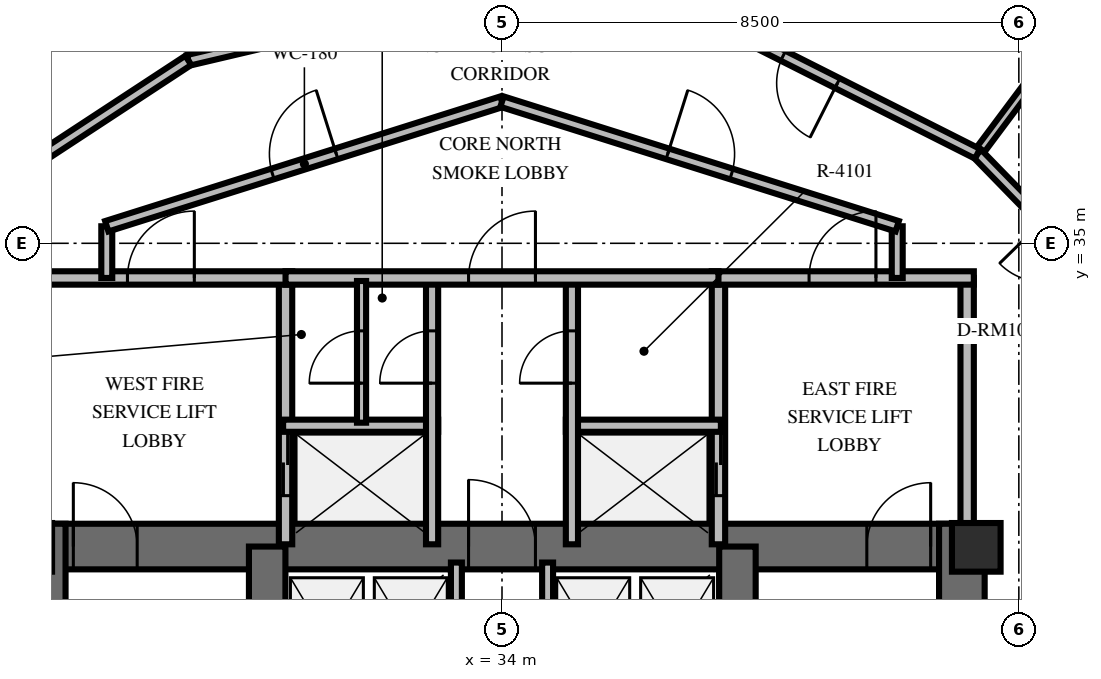
"""IFC4 building model, lengths in metres.
Left out: names, types, materials, properties, quantities, classifications, styles, units other than length and angle.
Written with IfcOpenShell. Run it as: python <this file> out.ifc"""

import sys

from ifc_helpers import new_model, si_unit, direction, frame, frame_2d, origin, origin_2d, place, context, subcontext, project, spatial, rectangle, extrude, element, fill, save


model = new_model("IFC4")
c1 = context("Model", 3, precision=1e-05, world=origin(), true_north=direction((0.0, 1.0)))
c2 = subcontext(c1, "Body", "Model", "MODEL_VIEW")
j1 = project(units=[si_unit("LENGTHUNIT", "METRE"), si_unit("PLANEANGLEUNIT", "RADIAN")], contexts=[c1])
p1 = place(None, origin())
s1 = spatial("IfcSite", under=j1, at=p1, CompositionType="ELEMENT")
p2 = place(p1, origin())
s2 = spatial("IfcBuilding", under=s1, at=p2, CompositionType="ELEMENT")
p3 = place(p2, frame((0.0, 0.0, 173.6)))
s3 = spatial("IfcBuildingStorey", under=s2, at=p3, CompositionType="ELEMENT", Elevation=173.6)
p4 = place(p3, frame((26.072, 30.013, 0.0), z_axis=(0.0, 0.0, 1.0), x_axis=(1.0, 0.0, 0.0)))
e1 = element("IfcWall", 1, at=p4, inside=s3, PredefinedType="SHEAR", context=c2, shape_type="SweptSolid", body=[
    extrude(rectangle(XDim=15.866, YDim=0.75, at=frame_2d((7.933, 0.0))), origin(), (0.0, 0.0, 1.0), 3.6),
])
p5 = place(p4, frame((0.878, 0.0, 0.0)))
e2 = element("IfcOpeningElement", 2, at=p5, cuts=e1, PredefinedType="OPENING", context=c2, shape_type="SweptSolid", body=[
    extrude(rectangle(XDim=1.05, YDim=2.15, at=frame_2d((0.525, 1.075))), frame((0.0, 0.385, 0.0), z_axis=(0.0, -1.0, 0.0), x_axis=(1.0, 0.0, 0.0)), (0.0, 0.0, 1.0), 0.77),
])
p6 = place(p4, frame((13.928, 0.0, 0.0)))
e3 = element("IfcOpeningElement", 3, at=p6, cuts=e1, PredefinedType="OPENING", context=c2, shape_type="SweptSolid", body=[
    extrude(rectangle(XDim=1.05, YDim=2.15, at=frame_2d((0.525, 1.075))), frame((0.0, 0.385, 0.0), z_axis=(0.0, -1.0, 0.0), x_axis=(1.0, 0.0, 0.0)), (0.0, 0.0, 1.0), 0.77),
])
p7 = place(p4, frame((7.378, 0.0, 0.0)))
e4 = element("IfcOpeningElement", 4, at=p7, cuts=e1, PredefinedType="OPENING", context=c2, shape_type="SweptSolid", body=[
    extrude(rectangle(XDim=1.1, YDim=2.15, at=frame_2d((0.55, 1.075))), frame((0.0, 0.385, 0.0), z_axis=(0.0, -1.0, 0.0), x_axis=(1.0, 0.0, 0.0)), (0.0, 0.0, 1.0), 0.77),
])
for number, where, z_axis, x_axis in (
    (5, (26.447, 19.812, 0.0), (0.0, 0.0, 1.0), (0.0, 1.0, 0.0)),
    (6, (41.563, 19.812, 0.0), (0.0, 0.0, 1.0), (0.0, 1.0, 0.0)),
):
    element("IfcWall", number, at=place(p3, frame(where, z_axis=z_axis, x_axis=x_axis)), inside=s3, PredefinedType="SHEAR", context=c2, shape_type="SweptSolid", body=[
        extrude(rectangle(XDim=10.576, YDim=0.75, at=frame_2d((5.288, 0.0))), origin(), (0.0, 0.0, 1.0), 3.6),
    ])
for number, where, z_axis, x_axis in (
    (7, (30.138, 20.187, 0.0), (0.0, 0.0, 1.0), (0.0, 1.0, 0.0)),
    (8, (37.872, 20.187, 0.0), (0.0, 0.0, 1.0), (0.0, 1.0, 0.0)),
):
    element("IfcWall", number, at=place(p3, frame(where, z_axis=z_axis, x_axis=x_axis)), inside=s3, PredefinedType="SHEAR", context=c2, shape_type="SweptSolid", body=[
        extrude(rectangle(XDim=9.826, YDim=0.6, at=frame_2d((4.913, 0.0))), origin(), (0.0, 0.0, 1.0), 3.6),
    ])
p8 = place(p3, frame((41.8, 30.0, 0.0), z_axis=(0.0, 0.0, 1.0), x_axis=(1.0, 0.0, 0.0)))
e9 = element("IfcColumn", 9, at=p8, inside=s3, PredefinedType="PILASTER", context=c2, shape_type="SweptSolid", body=[
    extrude(rectangle(XDim=0.8, YDim=0.8, at=origin_2d()), origin(), (0.0, 0.0, 1.0), 3.6),
])
p9 = place(p3, frame((30.44, 30.05, 0.0), z_axis=(0.0, 0.0, 1.0), x_axis=(0.0, 1.0, 0.0)))
e10 = element("IfcWall", 10, at=p9, inside=s3, PredefinedType="SOLIDWALL", context=c2, shape_type="SweptSolid", body=[
    extrude(rectangle(XDim=4.38, YDim=0.22, at=frame_2d((2.19, 0.0))), origin(), (0.0, 0.0, 1.0), 2.46),
])
p10 = place(p9, frame((0.8, 0.0, 0.0)))
e11 = element("IfcOpeningElement", 11, at=p10, cuts=e10, PredefinedType="OPENING", context=c2, shape_type="SweptSolid", body=[
    extrude(rectangle(XDim=1.05, YDim=2.1, at=frame_2d((0.525, 1.05))), frame((0.0, 0.12, 0.0), z_axis=(0.0, -1.0, 0.0), x_axis=(1.0, 0.0, 0.0)), (0.0, 0.0, 1.0), 0.24),
])
p11 = place(p3, frame((26.24, 34.43, 0.0), z_axis=(0.0, 0.0, 1.0), x_axis=(1.0, 0.0, 0.0)))
e12 = element("IfcWall", 12, at=p11, inside=s3, PredefinedType="SOLIDWALL", context=c2, shape_type="SweptSolid", body=[
    extrude(rectangle(XDim=4.31, YDim=0.22, at=frame_2d((2.155, 0.0))), origin(), (0.0, 0.0, 1.0), 2.46),
])
p12 = place(p11, frame((1.6, 0.0, 0.0)))
e13 = element("IfcOpeningElement", 13, at=p12, cuts=e12, PredefinedType="OPENING", context=c2, shape_type="SweptSolid", body=[
    extrude(rectangle(XDim=1.1, YDim=2.15, at=frame_2d((0.55, 1.075))), frame((0.0, 0.12, 0.0), z_axis=(0.0, -1.0, 0.0), x_axis=(1.0, 0.0, 0.0)), (0.0, 0.0, 1.0), 0.24),
])
p13 = place(p3, frame((30.4, 32.0, 0.0), z_axis=(0.0, 0.0, 1.0), x_axis=(1.0, 0.0, 0.0)))
e14 = element("IfcWall", 14, at=p13, inside=s3, PredefinedType="SOLIDWALL", context=c2, shape_type="SweptSolid", body=[
    extrude(rectangle(XDim=2.55, YDim=0.2, at=frame_2d((1.275, 0.0))), origin(), (0.0, 0.0, 1.0), 2.46),
])
p14 = place(p3, frame((32.85, 30.05, 0.0), z_axis=(0.0, 0.0, 1.0), x_axis=(0.0, 1.0, 0.0)))
e15 = element("IfcWall", 15, at=p14, inside=s3, PredefinedType="SOLIDWALL", context=c2, shape_type="SweptSolid", body=[
    extrude(rectangle(XDim=4.38, YDim=0.2, at=frame_2d((2.19, 0.0))), origin(), (0.0, 0.0, 1.0), 2.46),
])
p15 = place(p14, frame((2.65, 0.0, 0.0)))
e16 = element("IfcOpeningElement", 16, at=p15, cuts=e15, PredefinedType="OPENING", context=c2, shape_type="SweptSolid", body=[
    extrude(rectangle(XDim=0.86, YDim=2.05, at=frame_2d((0.43, 1.025))), frame((0.0, 0.11, 0.0), z_axis=(0.0, -1.0, 0.0), x_axis=(1.0, 0.0, 0.0)), (0.0, 0.0, 1.0), 0.22),
])
p16 = place(p3, frame((37.56, 30.05, 0.0), z_axis=(0.0, 0.0, 1.0), x_axis=(0.0, 1.0, 0.0)))
e17 = element("IfcWall", 17, at=p16, inside=s3, PredefinedType="SOLIDWALL", context=c2, shape_type="SweptSolid", body=[
    extrude(rectangle(XDim=4.38, YDim=0.22, at=frame_2d((2.19, 0.0))), origin(), (0.0, 0.0, 1.0), 2.46),
])
p17 = place(p16, frame((0.8, 0.0, 0.0)))
e18 = element("IfcOpeningElement", 18, at=p17, cuts=e17, PredefinedType="OPENING", context=c2, shape_type="SweptSolid", body=[
    extrude(rectangle(XDim=1.05, YDim=2.1, at=frame_2d((0.525, 1.05))), frame((0.0, 0.12, 0.0), z_axis=(0.0, -1.0, 0.0), x_axis=(1.0, 0.0, 0.0)), (0.0, 0.0, 1.0), 0.24),
])
p18 = place(p3, frame((41.65, 30.05, 0.0), z_axis=(0.0, 0.0, 1.0), x_axis=(0.0, 1.0, 0.0)))
e19 = element("IfcWall", 19, at=p18, inside=s3, PredefinedType="SOLIDWALL", context=c2, shape_type="SweptSolid", body=[
    extrude(rectangle(XDim=4.38, YDim=0.22, at=frame_2d((2.19, 0.0))), origin(), (0.0, 0.0, 1.0), 2.46),
])
p19 = place(p3, frame((37.45, 34.43, 0.0), z_axis=(0.0, 0.0, 1.0), x_axis=(1.0, 0.0, 0.0)))
e20 = element("IfcWall", 20, at=p19, inside=s3, PredefinedType="SOLIDWALL", context=c2, shape_type="SweptSolid", body=[
    extrude(rectangle(XDim=4.31, YDim=0.22, at=frame_2d((2.155, 0.0))), origin(), (0.0, 0.0, 1.0), 2.46),
])
p20 = place(p19, frame((1.6, 0.0, 0.0)))
e21 = element("IfcOpeningElement", 21, at=p20, cuts=e20, PredefinedType="OPENING", context=c2, shape_type="SweptSolid", body=[
    extrude(rectangle(XDim=1.1, YDim=2.15, at=frame_2d((0.55, 1.075))), frame((0.0, 0.12, 0.0), z_axis=(0.0, -1.0, 0.0), x_axis=(1.0, 0.0, 0.0)), (0.0, 0.0, 1.0), 0.24),
])
p21 = place(p3, frame((35.05, 32.0, 0.0), z_axis=(0.0, 0.0, 1.0), x_axis=(1.0, 0.0, 0.0)))
e22 = element("IfcWall", 22, at=p21, inside=s3, PredefinedType="SOLIDWALL", context=c2, shape_type="SweptSolid", body=[
    extrude(rectangle(XDim=2.55, YDim=0.2, at=frame_2d((1.275, 0.0))), origin(), (0.0, 0.0, 1.0), 2.46),
])
p22 = place(p3, frame((35.15, 30.05, 0.0), z_axis=(0.0, 0.0, 1.0), x_axis=(0.0, 1.0, 0.0)))
e23 = element("IfcWall", 23, at=p22, inside=s3, PredefinedType="SOLIDWALL", context=c2, shape_type="SweptSolid", body=[
    extrude(rectangle(XDim=4.38, YDim=0.2, at=frame_2d((2.19, 0.0))), origin(), (0.0, 0.0, 1.0), 2.46),
])
p23 = place(p22, frame((2.65, 0.0, 0.0)))
e24 = element("IfcOpeningElement", 24, at=p23, cuts=e23, PredefinedType="OPENING", context=c2, shape_type="SweptSolid", body=[
    extrude(rectangle(XDim=0.86, YDim=2.05, at=frame_2d((0.43, 1.025))), frame((0.0, 0.11, 0.0), z_axis=(0.0, -1.0, 0.0), x_axis=(1.0, 0.0, 0.0)), (0.0, 0.0, 1.0), 0.22),
])
p24 = place(p3, frame((30.44, 34.43, 0.0), z_axis=(0.0, 0.0, 1.0), x_axis=(1.0, 0.0, 0.0)))
e25 = element("IfcWall", 25, at=p24, inside=s3, PredefinedType="SOLIDWALL", context=c2, shape_type="SweptSolid", body=[
    extrude(rectangle(XDim=7.12, YDim=0.22, at=frame_2d((3.56, 0.0))), origin(), (0.0, 0.0, 1.0), 2.46),
])
p25 = place(p24, frame((3.01, 0.0, 0.0)))
e26 = element("IfcOpeningElement", 26, at=p25, cuts=e25, PredefinedType="OPENING", context=c2, shape_type="SweptSolid", body=[
    extrude(rectangle(XDim=1.1, YDim=2.15, at=frame_2d((0.55, 1.075))), frame((0.0, 0.12, 0.0), z_axis=(0.0, -1.0, 0.0), x_axis=(1.0, 0.0, 0.0)), (0.0, 0.0, 1.0), 0.24),
])
p26 = place(p3, frame((31.69, 32.05, 0.0), z_axis=(0.0, 0.0, 1.0), x_axis=(0.0, 1.0, 0.0)))
e27 = element("IfcWall", 27, at=p26, inside=s3, PredefinedType="PARTITIONING", context=c2, shape_type="SweptSolid", body=[
    extrude(rectangle(XDim=2.33, YDim=0.15, at=frame_2d((1.165, 0.0))), origin(), (0.0, 0.0, 1.0), 2.46),
])
p27 = place(p26, frame((0.65, 0.0, 0.0)))
e28 = element("IfcOpeningElement", 28, at=p27, cuts=e27, PredefinedType="OPENING", context=c2, shape_type="SweptSolid", body=[
    extrude(rectangle(XDim=0.86, YDim=2.05, at=frame_2d((0.43, 1.025))), frame((0.0, 0.085, 0.0), z_axis=(0.0, -1.0, 0.0), x_axis=(1.0, 0.0, 0.0)), (0.0, 0.0, 1.0), 0.17),
])
for number, where, z_axis, x_axis in (
    (29, (33.25, 27.28, 0.0), (0.0, 0.0, 1.0), (0.0, 1.0, 0.0)),
    (30, (34.75, 27.28, 0.0), (0.0, 0.0, 1.0), (0.0, 1.0, 0.0)),
):
    element("IfcWall", number, at=place(p3, frame(where, z_axis=z_axis, x_axis=x_axis)), inside=s3, PredefinedType="SOLIDWALL", context=c2, shape_type="SweptSolid", body=[
        extrude(rectangle(XDim=2.47, YDim=0.18, at=frame_2d((1.235, 0.0))), origin(), (0.0, 0.0, 1.0), 2.46),
    ])
for number, where, z_axis, x_axis in (
    (31, (27.5, 34.43, 0.0), (0.0, 0.0, 1.0), (0.0, 1.0, 0.0)),
    (32, (40.5, 35.28, 0.0), (0.0, 0.0, 1.0), (0.0, -1.0, 0.0)),
):
    element("IfcWall", number, at=place(p3, frame(where, z_axis=z_axis, x_axis=x_axis)), inside=s3, PredefinedType="PARTITIONING", context=c2, shape_type="SweptSolid", body=[
        extrude(rectangle(XDim=0.85, YDim=0.18, at=frame_2d((0.425, 0.0))), origin(), (0.0, 0.0, 1.0), 2.46),
    ])
p28 = place(p3, frame((27.5, 35.28, 0.0), z_axis=(0.0, 0.0, 1.0), x_axis=(0.953691418528, 0.300786765376, 0.0)))
e33 = element("IfcWall", 33, at=p28, inside=s3, PredefinedType="PARTITIONING", context=c2, shape_type="SweptSolid", body=[
    extrude(rectangle(XDim=6.816, YDim=0.18, at=frame_2d((3.408, 0.0))), origin(), (0.0, 0.0, 1.0), 2.46),
])
p29 = place(p28, frame((2.858, 0.0, 0.0)))
e34 = element("IfcOpeningElement", 34, at=p29, cuts=e33, PredefinedType="OPENING", context=c2, shape_type="SweptSolid", body=[
    extrude(rectangle(XDim=1.1, YDim=2.15, at=frame_2d((0.55, 1.075))), frame((0.0, 0.1, 0.0), z_axis=(0.0, -1.0, 0.0), x_axis=(1.0, 0.0, 0.0)), (0.0, 0.0, 1.0), 0.2),
])
p30 = place(p3, frame((34.0, 37.33, 0.0), z_axis=(0.0, 0.0, 1.0), x_axis=(0.953691418528, -0.300786765376, 0.0)))
e35 = element("IfcWall", 35, at=p30, inside=s3, PredefinedType="PARTITIONING", context=c2, shape_type="SweptSolid", body=[
    extrude(rectangle(XDim=6.816, YDim=0.18, at=frame_2d((3.408, 0.0))), origin(), (0.0, 0.0, 1.0), 2.46),
])
p31 = place(p30, frame((2.858, 0.0, 0.0)))
e36 = element("IfcOpeningElement", 36, at=p31, cuts=e35, PredefinedType="OPENING", context=c2, shape_type="SweptSolid", body=[
    extrude(rectangle(XDim=1.1, YDim=2.15, at=frame_2d((0.55, 1.075))), frame((0.0, 0.1, 0.0), z_axis=(0.0, -1.0, 0.0), x_axis=(1.0, 0.0, 0.0)), (0.0, 0.0, 1.0), 0.2),
])
p32 = place(p3, frame((41.82, 36.472, 0.0), z_axis=(0.0, 0.0, 1.0), x_axis=(0.598335177015, 0.801245914777, 0.0)))
e37 = element("IfcWall", 37, at=p32, inside=s3, PredefinedType="PARTITIONING", context=c2, shape_type="SweptSolid", body=[
    extrude(rectangle(XDim=9.416, YDim=0.15, at=frame_2d((4.708, 0.0))), origin(), (0.0, 0.0, 1.0), 2.46),
])
p33 = place(p3, frame((44.674, 33.543, 0.0), z_axis=(0.0, 0.0, 1.0), x_axis=(-0.697792477358, 0.716299978041, 0.0)))
e38 = element("IfcWall", 38, at=p33, inside=s3, PredefinedType="PARTITIONING", context=c2, shape_type="SweptSolid", body=[
    extrude(rectangle(XDim=4.089, YDim=0.18, at=frame_2d((2.045, 0.0))), origin(), (0.0, 0.0, 1.0), 2.46),
])
p34 = place(p33, frame((1.545, 0.0, 0.0)))
e39 = element("IfcOpeningElement", 39, at=p34, cuts=e38, PredefinedType="OPENING", context=c2, shape_type="SweptSolid", body=[
    extrude(rectangle(XDim=1.0, YDim=2.15, at=frame_2d((0.5, 1.075))), frame((0.0, 0.1, 0.0), z_axis=(0.0, -1.0, 0.0), x_axis=(1.0, 0.0, 0.0)), (0.0, 0.0, 1.0), 0.2),
])
p35 = place(p3, frame((41.82, 36.472, 0.0), z_axis=(0.0, 0.0, 1.0), x_axis=(-0.892991933776, 0.450072667701, 0.0)))
e40 = element("IfcWall", 40, at=p35, inside=s3, PredefinedType="PARTITIONING", context=c2, shape_type="SweptSolid", body=[
    extrude(rectangle(XDim=4.539, YDim=0.18, at=frame_2d((2.27, 0.0))), origin(), (0.0, 0.0, 1.0), 2.46),
])
p36 = place(p35, frame((2.579, 0.0, 0.0)))
e41 = element("IfcOpeningElement", 41, at=p36, cuts=e40, PredefinedType="OPENING", context=c2, shape_type="SweptSolid", body=[
    extrude(rectangle(XDim=1.0, YDim=2.15, at=frame_2d((0.5, 1.075))), frame((0.0, 0.1, 0.0), z_axis=(0.0, -1.0, 0.0), x_axis=(1.0, 0.0, 0.0)), (0.0, 0.0, 1.0), 0.2),
])
p37 = place(p3, frame((33.259, 39.049, 0.0), z_axis=(0.0, 0.0, 1.0), x_axis=(-0.973370592217, -0.229237192022, 0.0)))
e42 = element("IfcWall", 42, at=p37, inside=s3, PredefinedType="PARTITIONING", context=c2, shape_type="SweptSolid", body=[
    extrude(rectangle(XDim=4.539, YDim=0.18, at=frame_2d((2.27, 0.0))), origin(), (0.0, 0.0, 1.0), 2.46),
])
p38 = place(p3, frame((28.841, 38.009, 0.0), z_axis=(0.0, 0.0, 1.0), x_axis=(-0.836295307945, -0.548279269998, 0.0)))
e43 = element("IfcWall", 43, at=p38, inside=s3, PredefinedType="PARTITIONING", context=c2, shape_type="SweptSolid", body=[
    extrude(rectangle(XDim=4.539, YDim=0.18, at=frame_2d((2.27, 0.0))), origin(), (0.0, 0.0, 1.0), 2.46),
])
p39 = place(p3, frame((43.077, 38.155, 0.0), z_axis=(0.0, 0.0, 1.0), x_axis=(-0.892986088423, 0.450084265313, 0.0)))
e44 = element("IfcWall", 44, at=p39, inside=s3, PredefinedType="PARTITIONING", context=c2, shape_type="SweptSolid", body=[
    extrude(rectangle(XDim=5.269, YDim=0.15, at=frame_2d((2.634, 0.0))), origin(), (0.0, 0.0, 1.0), 2.46),
])
p40 = place(p39, frame((3.149, 0.0, 0.0)))
e45 = element("IfcOpeningElement", 45, at=p40, cuts=e44, PredefinedType="OPENING", context=c2, shape_type="SweptSolid", body=[
    extrude(rectangle(XDim=0.95, YDim=2.15, at=frame_2d((0.475, 1.075))), frame((0.0, 0.085, 0.0), z_axis=(0.0, -1.0, 0.0), x_axis=(1.0, 0.0, 0.0)), (0.0, 0.0, 1.0), 0.17),
])
p41 = place(p3, frame((28.012, 39.938, 0.0), z_axis=(0.0, 0.0, 1.0), x_axis=(-0.836288953653, -0.548288962134, 0.0)))
e46 = element("IfcWall", 46, at=p41, inside=s3, PredefinedType="PARTITIONING", context=c2, shape_type="SweptSolid", body=[
    extrude(rectangle(XDim=5.269, YDim=0.15, at=frame_2d((2.634, 0.0))), origin(), (0.0, 0.0, 1.0), 2.46),
])
p42 = place(p5, origin())
e47 = element("IfcDoor", 47, at=p42, inside=s3, OperationType="SINGLE_SWING_LEFT", PredefinedType="DOOR", context=c2, shape_type="SweptSolid", body=[
    extrude(rectangle(XDim=1.05, YDim=2.15, at=frame_2d((0.525, 1.075))), frame((0.0, 0.025, 0.0), z_axis=(0.0, -1.0, 0.0), x_axis=(1.0, 0.0, 0.0)), (0.0, 0.0, 1.0), 0.05),
])
fill(e2, e47)
p43 = place(p6, origin())
e48 = element("IfcDoor", 48, at=p43, inside=s3, OperationType="SINGLE_SWING_RIGHT", PredefinedType="DOOR", context=c2, shape_type="SweptSolid", body=[
    extrude(rectangle(XDim=1.05, YDim=2.15, at=frame_2d((0.525, 1.075))), frame((0.0, 0.025, 0.0), z_axis=(0.0, -1.0, 0.0), x_axis=(1.0, 0.0, 0.0)), (0.0, 0.0, 1.0), 0.05),
])
fill(e3, e48)
p44 = place(p7, origin())
e49 = element("IfcDoor", 49, at=p44, inside=s3, OperationType="SINGLE_SWING_LEFT", PredefinedType="DOOR", context=c2, shape_type="SweptSolid", body=[
    extrude(rectangle(XDim=1.1, YDim=2.15, at=frame_2d((0.55, 1.075))), frame((0.0, 0.025, 0.0), z_axis=(0.0, -1.0, 0.0), x_axis=(1.0, 0.0, 0.0)), (0.0, 0.0, 1.0), 0.05),
])
fill(e4, e49)
p45 = place(p12, origin())
e50 = element("IfcDoor", 50, at=p45, inside=s3, OperationType="SINGLE_SWING_RIGHT", PredefinedType="DOOR", context=c2, shape_type="SweptSolid", body=[
    extrude(rectangle(XDim=1.1, YDim=2.15, at=frame_2d((0.55, 1.075))), frame((0.0, 0.025, 0.0), z_axis=(0.0, -1.0, 0.0), x_axis=(1.0, 0.0, 0.0)), (0.0, 0.0, 1.0), 0.05),
])
fill(e13, e50)
p46 = place(p10, origin())
e51 = element("IfcDoor", 51, at=p46, inside=s3, OperationType="DOUBLE_DOOR_SLIDING", PredefinedType="USERDEFINED", context=c2, shape_type="SweptSolid", body=[
    extrude(rectangle(XDim=1.05, YDim=2.1, at=frame_2d((0.525, 1.05))), frame((0.0, 0.025, 0.0), z_axis=(0.0, -1.0, 0.0), x_axis=(1.0, 0.0, 0.0)), (0.0, 0.0, 1.0), 0.05),
])
fill(e11, e51)
p47 = place(p15, origin())
e52 = element("IfcDoor", 52, at=p47, inside=s3, OperationType="SINGLE_SWING_LEFT", PredefinedType="TRAPDOOR", context=c2, shape_type="SweptSolid", body=[
    extrude(rectangle(XDim=0.86, YDim=2.05, at=frame_2d((0.43, 1.025))), frame((0.0, 0.025, 0.0), z_axis=(0.0, -1.0, 0.0), x_axis=(1.0, 0.0, 0.0)), (0.0, 0.0, 1.0), 0.05),
])
fill(e16, e52)
p48 = place(p20, origin())
e53 = element("IfcDoor", 53, at=p48, inside=s3, OperationType="SINGLE_SWING_RIGHT", PredefinedType="DOOR", context=c2, shape_type="SweptSolid", body=[
    extrude(rectangle(XDim=1.1, YDim=2.15, at=frame_2d((0.55, 1.075))), frame((0.0, 0.025, 0.0), z_axis=(0.0, -1.0, 0.0), x_axis=(1.0, 0.0, 0.0)), (0.0, 0.0, 1.0), 0.05),
])
fill(e21, e53)
p49 = place(p17, origin())
e54 = element("IfcDoor", 54, at=p49, inside=s3, OperationType="DOUBLE_DOOR_SLIDING", PredefinedType="USERDEFINED", context=c2, shape_type="SweptSolid", body=[
    extrude(rectangle(XDim=1.05, YDim=2.1, at=frame_2d((0.525, 1.05))), frame((0.0, 0.025, 0.0), z_axis=(0.0, -1.0, 0.0), x_axis=(1.0, 0.0, 0.0)), (0.0, 0.0, 1.0), 0.05),
])
fill(e18, e54)
p50 = place(p23, origin())
e55 = element("IfcDoor", 55, at=p50, inside=s3, OperationType="SINGLE_SWING_LEFT", PredefinedType="TRAPDOOR", context=c2, shape_type="SweptSolid", body=[
    extrude(rectangle(XDim=0.86, YDim=2.05, at=frame_2d((0.43, 1.025))), frame((0.0, 0.025, 0.0), z_axis=(0.0, -1.0, 0.0), x_axis=(1.0, 0.0, 0.0)), (0.0, 0.0, 1.0), 0.05),
])
fill(e24, e55)
p51 = place(p25, origin())
e56 = element("IfcDoor", 56, at=p51, inside=s3, OperationType="SINGLE_SWING_RIGHT", PredefinedType="DOOR", context=c2, shape_type="SweptSolid", body=[
    extrude(rectangle(XDim=1.1, YDim=2.15, at=frame_2d((0.55, 1.075))), frame((0.0, 0.025, 0.0), z_axis=(0.0, -1.0, 0.0), x_axis=(1.0, 0.0, 0.0)), (0.0, 0.0, 1.0), 0.05),
])
fill(e26, e56)
p52 = place(p27, origin())
e57 = element("IfcDoor", 57, at=p52, inside=s3, OperationType="SINGLE_SWING_LEFT", PredefinedType="TRAPDOOR", context=c2, shape_type="SweptSolid", body=[
    extrude(rectangle(XDim=0.86, YDim=2.05, at=frame_2d((0.43, 1.025))), frame((0.0, 0.025, 0.0), z_axis=(0.0, -1.0, 0.0), x_axis=(1.0, 0.0, 0.0)), (0.0, 0.0, 1.0), 0.05),
])
fill(e28, e57)
p53 = place(p29, origin())
e58 = element("IfcDoor", 58, at=p53, inside=s3, OperationType="SINGLE_SWING_RIGHT", PredefinedType="DOOR", context=c2, shape_type="SweptSolid", body=[
    extrude(rectangle(XDim=1.1, YDim=2.15, at=frame_2d((0.55, 1.075))), frame((0.0, 0.025, 0.0), z_axis=(0.0, -1.0, 0.0), x_axis=(1.0, 0.0, 0.0)), (0.0, 0.0, 1.0), 0.05),
])
fill(e34, e58)
p54 = place(p31, origin())
e59 = element("IfcDoor", 59, at=p54, inside=s3, OperationType="SINGLE_SWING_LEFT", PredefinedType="DOOR", context=c2, shape_type="SweptSolid", body=[
    extrude(rectangle(XDim=1.1, YDim=2.15, at=frame_2d((0.55, 1.075))), frame((0.0, 0.025, 0.0), z_axis=(0.0, -1.0, 0.0), x_axis=(1.0, 0.0, 0.0)), (0.0, 0.0, 1.0), 0.05),
])
fill(e36, e59)
p55 = place(p36, origin())
e60 = element("IfcDoor", 60, at=p55, inside=s3, OperationType="SINGLE_SWING_LEFT", PredefinedType="DOOR", context=c2, shape_type="SweptSolid", body=[
    extrude(rectangle(XDim=1.0, YDim=2.15, at=frame_2d((0.5, 1.075))), frame((0.0, 0.025, 0.0), z_axis=(0.0, -1.0, 0.0), x_axis=(1.0, 0.0, 0.0)), (0.0, 0.0, 1.0), 0.05),
])
fill(e41, e60)
save(model, sys.argv[1])
